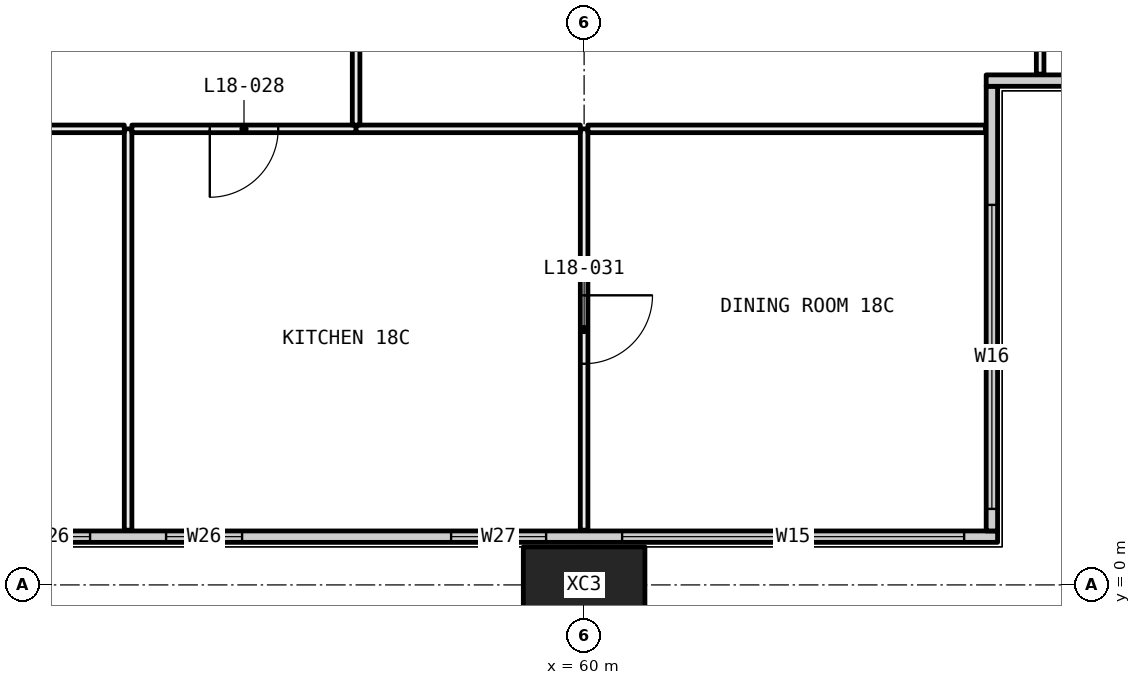
"""IFC4 building model, lengths in metres.
Left out: names, types, materials, properties, quantities, classifications, styles, units other than length and angle.
Written with IfcOpenShell. Run it as: python <this file> out.ifc"""

import sys

from ifc_helpers import new_model, si_unit, direction, frame, frame_2d, origin, origin_2d, place, context, subcontext, project, spatial, rectangle, hollow_rectangle, extrude, element, fill, save


model = new_model("IFC4")
c1 = context("Model", 3, precision=1e-05, world=origin(), true_north=direction((0.0, 1.0)))
c2 = subcontext(c1, "Body", "Model", "MODEL_VIEW")
j1 = project(units=[si_unit("LENGTHUNIT", "METRE"), si_unit("PLANEANGLEUNIT", "RADIAN")], contexts=[c1])
p1 = place(None, origin())
s1 = spatial("IfcSite", under=j1, at=p1, CompositionType="ELEMENT")
p2 = place(p1, origin())
s2 = spatial("IfcBuilding", under=s1, at=p2, CompositionType="ELEMENT")
p3 = place(p2, frame((0.0, 0.0, 74.85)))
s3 = spatial("IfcBuildingStorey", under=s2, at=p3, CompositionType="ELEMENT", Elevation=74.85)
p4 = place(p3, frame((60.0, 0.0, -0.4), z_axis=(0.0, 0.0, 1.0), x_axis=(1.0, 0.0, 0.0)))
e1 = element("IfcColumn", 1, at=p4, inside=s3, PredefinedType="COLUMN", context=c2, shape_type="SweptSolid", body=[
    extrude(hollow_rectangle(XDim=1.6, YDim=1.0, WallThickness=0.065, at=origin_2d()), origin(), (0.0, 0.0, 1.0), 3.45),
])
p5 = place(p3, frame((6.56, 0.635, 0.0), z_axis=(0.0, 0.0, 1.0), x_axis=(1.0, 0.0, 0.0)))
e2 = element("IfcWall", 2, at=p5, inside=s3, PredefinedType="ELEMENTEDWALL", context=c2, shape_type="SweptSolid", body=[
    extrude(rectangle(XDim=58.88, YDim=0.15, at=frame_2d((29.44, 0.0))), origin(), (0.0, 0.0, 1.0), 3.05),
])
p6 = place(p5, frame((0.44, 0.0, 0.45)))
e3 = element("IfcOpeningElement", 3, at=p6, cuts=e2, PredefinedType="OPENING", context=c2, shape_type="SweptSolid", body=[
    extrude(rectangle(XDim=4.5, YDim=2.55, at=frame_2d((2.25, 1.275))), frame((0.0, 0.085, 0.0), z_axis=(0.0, -1.0, 0.0), x_axis=(1.0, 0.0, 0.0)), (0.0, 0.0, 1.0), 0.17),
])
p7 = place(p5, frame((5.94, 0.0, 0.45)))
e4 = element("IfcOpeningElement", 4, at=p7, cuts=e2, PredefinedType="OPENING", context=c2, shape_type="SweptSolid", body=[
    extrude(rectangle(XDim=1.25, YDim=2.55, at=frame_2d((0.625, 1.275))), frame((0.0, 0.085, 0.0), z_axis=(0.0, -1.0, 0.0), x_axis=(1.0, 0.0, 0.0)), (0.0, 0.0, 1.0), 0.17),
])
p8 = place(p5, frame((9.94, 0.0, 0.45)))
e5 = element("IfcOpeningElement", 5, at=p8, cuts=e2, PredefinedType="OPENING", context=c2, shape_type="SweptSolid", body=[
    extrude(rectangle(XDim=1.0, YDim=2.55, at=frame_2d((0.5, 1.275))), frame((0.0, 0.085, 0.0), z_axis=(0.0, -1.0, 0.0), x_axis=(1.0, 0.0, 0.0)), (0.0, 0.0, 1.0), 0.17),
])
p9 = place(p5, frame((11.94, 0.0, 0.45)))
e6 = element("IfcOpeningElement", 6, at=p9, cuts=e2, PredefinedType="OPENING", context=c2, shape_type="SweptSolid", body=[
    extrude(rectangle(XDim=1.0, YDim=2.55, at=frame_2d((0.5, 1.275))), frame((0.0, 0.085, 0.0), z_axis=(0.0, -1.0, 0.0), x_axis=(1.0, 0.0, 0.0)), (0.0, 0.0, 1.0), 0.17),
])
p10 = place(p5, frame((15.69, 0.0, 0.45)))
e7 = element("IfcOpeningElement", 7, at=p10, cuts=e2, PredefinedType="OPENING", context=c2, shape_type="SweptSolid", body=[
    extrude(rectangle(XDim=1.25, YDim=2.55, at=frame_2d((0.625, 1.275))), frame((0.0, 0.085, 0.0), z_axis=(0.0, -1.0, 0.0), x_axis=(1.0, 0.0, 0.0)), (0.0, 0.0, 1.0), 0.17),
])
p11 = place(p5, frame((17.94, 0.0, 0.45)))
e8 = element("IfcOpeningElement", 8, at=p11, cuts=e2, PredefinedType="OPENING", context=c2, shape_type="SweptSolid", body=[
    extrude(rectangle(XDim=1.25, YDim=2.55, at=frame_2d((0.625, 1.275))), frame((0.0, 0.085, 0.0), z_axis=(0.0, -1.0, 0.0), x_axis=(1.0, 0.0, 0.0)), (0.0, 0.0, 1.0), 0.17),
])
p12 = place(p5, frame((21.94, 0.0, 0.45)))
e9 = element("IfcOpeningElement", 9, at=p12, cuts=e2, PredefinedType="OPENING", context=c2, shape_type="SweptSolid", body=[
    extrude(rectangle(XDim=1.0, YDim=2.55, at=frame_2d((0.5, 1.275))), frame((0.0, 0.085, 0.0), z_axis=(0.0, -1.0, 0.0), x_axis=(1.0, 0.0, 0.0)), (0.0, 0.0, 1.0), 0.17),
])
p13 = place(p5, frame((23.94, 0.0, 0.45)))
e10 = element("IfcOpeningElement", 10, at=p13, cuts=e2, PredefinedType="OPENING", context=c2, shape_type="SweptSolid", body=[
    extrude(rectangle(XDim=1.0, YDim=2.55, at=frame_2d((0.5, 1.275))), frame((0.0, 0.085, 0.0), z_axis=(0.0, -1.0, 0.0), x_axis=(1.0, 0.0, 0.0)), (0.0, 0.0, 1.0), 0.17),
])
p14 = place(p5, frame((27.69, 0.0, 0.45)))
e11 = element("IfcOpeningElement", 11, at=p14, cuts=e2, PredefinedType="OPENING", context=c2, shape_type="SweptSolid", body=[
    extrude(rectangle(XDim=1.25, YDim=2.55, at=frame_2d((0.625, 1.275))), frame((0.0, 0.085, 0.0), z_axis=(0.0, -1.0, 0.0), x_axis=(1.0, 0.0, 0.0)), (0.0, 0.0, 1.0), 0.17),
])
p15 = place(p5, frame((29.94, 0.0, 0.45)))
e12 = element("IfcOpeningElement", 12, at=p15, cuts=e2, PredefinedType="OPENING", context=c2, shape_type="SweptSolid", body=[
    extrude(rectangle(XDim=1.25, YDim=2.55, at=frame_2d((0.625, 1.275))), frame((0.0, 0.085, 0.0), z_axis=(0.0, -1.0, 0.0), x_axis=(1.0, 0.0, 0.0)), (0.0, 0.0, 1.0), 0.17),
])
p16 = place(p5, frame((33.94, 0.0, 0.45)))
e13 = element("IfcOpeningElement", 13, at=p16, cuts=e2, PredefinedType="OPENING", context=c2, shape_type="SweptSolid", body=[
    extrude(rectangle(XDim=1.0, YDim=2.55, at=frame_2d((0.5, 1.275))), frame((0.0, 0.085, 0.0), z_axis=(0.0, -1.0, 0.0), x_axis=(1.0, 0.0, 0.0)), (0.0, 0.0, 1.0), 0.17),
])
p17 = place(p5, frame((35.94, 0.0, 0.45)))
e14 = element("IfcOpeningElement", 14, at=p17, cuts=e2, PredefinedType="OPENING", context=c2, shape_type="SweptSolid", body=[
    extrude(rectangle(XDim=1.0, YDim=2.55, at=frame_2d((0.5, 1.275))), frame((0.0, 0.085, 0.0), z_axis=(0.0, -1.0, 0.0), x_axis=(1.0, 0.0, 0.0)), (0.0, 0.0, 1.0), 0.17),
])
p18 = place(p5, frame((39.69, 0.0, 0.45)))
e15 = element("IfcOpeningElement", 15, at=p18, cuts=e2, PredefinedType="OPENING", context=c2, shape_type="SweptSolid", body=[
    extrude(rectangle(XDim=1.25, YDim=2.55, at=frame_2d((0.625, 1.275))), frame((0.0, 0.085, 0.0), z_axis=(0.0, -1.0, 0.0), x_axis=(1.0, 0.0, 0.0)), (0.0, 0.0, 1.0), 0.17),
])
p19 = place(p5, frame((41.94, 0.0, 0.45)))
e16 = element("IfcOpeningElement", 16, at=p19, cuts=e2, PredefinedType="OPENING", context=c2, shape_type="SweptSolid", body=[
    extrude(rectangle(XDim=1.25, YDim=2.55, at=frame_2d((0.625, 1.275))), frame((0.0, 0.085, 0.0), z_axis=(0.0, -1.0, 0.0), x_axis=(1.0, 0.0, 0.0)), (0.0, 0.0, 1.0), 0.17),
])
p20 = place(p5, frame((45.94, 0.0, 0.45)))
e17 = element("IfcOpeningElement", 17, at=p20, cuts=e2, PredefinedType="OPENING", context=c2, shape_type="SweptSolid", body=[
    extrude(rectangle(XDim=1.0, YDim=2.55, at=frame_2d((0.5, 1.275))), frame((0.0, 0.085, 0.0), z_axis=(0.0, -1.0, 0.0), x_axis=(1.0, 0.0, 0.0)), (0.0, 0.0, 1.0), 0.17),
])
p21 = place(p5, frame((47.94, 0.0, 0.45)))
e18 = element("IfcOpeningElement", 18, at=p21, cuts=e2, PredefinedType="OPENING", context=c2, shape_type="SweptSolid", body=[
    extrude(rectangle(XDim=1.0, YDim=2.55, at=frame_2d((0.5, 1.275))), frame((0.0, 0.085, 0.0), z_axis=(0.0, -1.0, 0.0), x_axis=(1.0, 0.0, 0.0)), (0.0, 0.0, 1.0), 0.17),
])
p22 = place(p5, frame((51.69, 0.0, 0.45)))
e19 = element("IfcOpeningElement", 19, at=p22, cuts=e2, PredefinedType="OPENING", context=c2, shape_type="SweptSolid", body=[
    extrude(rectangle(XDim=1.25, YDim=2.55, at=frame_2d((0.625, 1.275))), frame((0.0, 0.085, 0.0), z_axis=(0.0, -1.0, 0.0), x_axis=(1.0, 0.0, 0.0)), (0.0, 0.0, 1.0), 0.17),
])
p23 = place(p5, frame((53.94, 0.0, 0.45)))
e20 = element("IfcOpeningElement", 20, at=p23, cuts=e2, PredefinedType="OPENING", context=c2, shape_type="SweptSolid", body=[
    extrude(rectangle(XDim=4.5, YDim=2.55, at=frame_2d((2.25, 1.275))), frame((0.0, 0.085, 0.0), z_axis=(0.0, -1.0, 0.0), x_axis=(1.0, 0.0, 0.0)), (0.0, 0.0, 1.0), 0.17),
])
p24 = place(p3, frame((65.365, 0.71, 0.0), z_axis=(0.0, 0.0, 1.0), x_axis=(0.0, 1.0, 0.0)))
e21 = element("IfcWall", 21, at=p24, inside=s3, PredefinedType="ELEMENTEDWALL", context=c2, shape_type="SweptSolid", body=[
    extrude(rectangle(XDim=5.85, YDim=0.15, at=frame_2d((2.925, 0.0))), origin(), (0.0, 0.0, 1.0), 3.05),
])
p25 = place(p24, frame((0.29, 0.0, 0.45)))
e22 = element("IfcOpeningElement", 22, at=p25, cuts=e21, PredefinedType="OPENING", context=c2, shape_type="SweptSolid", body=[
    extrude(rectangle(XDim=4.0, YDim=2.55, at=frame_2d((2.0, 1.275))), frame((0.0, 0.085, 0.0), z_axis=(0.0, -1.0, 0.0), x_axis=(1.0, 0.0, 0.0)), (0.0, 0.0, 1.0), 0.17),
])
p26 = place(p3, frame((65.29, 6.635, 0.0), z_axis=(0.0, 0.0, 1.0), x_axis=(1.0, 0.0, 0.0)))
e23 = element("IfcWall", 23, at=p26, inside=s3, PredefinedType="ELEMENTEDWALL", context=c2, shape_type="SweptSolid", body=[
    extrude(rectangle(XDim=6.15, YDim=0.15, at=frame_2d((3.075, 0.0))), origin(), (0.0, 0.0, 1.0), 3.05),
])
p27 = place(p26, frame((1.71, 0.0, 0.45)))
e24 = element("IfcOpeningElement", 24, at=p27, cuts=e23, PredefinedType="OPENING", context=c2, shape_type="SweptSolid", body=[
    extrude(rectangle(XDim=4.0, YDim=2.55, at=frame_2d((2.0, 1.275))), frame((0.0, 0.085, 0.0), z_axis=(0.0, -1.0, 0.0), x_axis=(1.0, 0.0, 0.0)), (0.0, 0.0, 1.0), 0.17),
])
p28 = place(p3, frame((54.0, 0.72, 0.0), z_axis=(0.0, 0.0, 1.0), x_axis=(0.0, 1.0, 0.0)))
e25 = element("IfcWall", 25, at=p28, inside=s3, PredefinedType="PARTITIONING", context=c2, shape_type="SweptSolid", body=[
    extrude(rectangle(XDim=5.28, YDim=0.1, at=frame_2d((2.64, 0.0))), origin(), (0.0, 0.0, 1.0), 3.05),
])
p29 = place(p3, frame((53.95, 6.0, 0.0), z_axis=(0.0, 0.0, 1.0), x_axis=(-1.0, 0.0, 0.0)))
e26 = element("IfcWall", 26, at=p29, inside=s3, PredefinedType="PARTITIONING", context=c2, shape_type="SweptSolid", body=[
    extrude(rectangle(XDim=5.9, YDim=0.1, at=frame_2d((2.95, 0.0))), origin(), (0.0, 0.0, 1.0), 2.45),
])
p30 = place(p29, frame((2.5, 0.0, 0.0)))
e27 = element("IfcOpeningElement", 27, at=p30, cuts=e26, PredefinedType="OPENING", context=c2, shape_type="SweptSolid", body=[
    extrude(rectangle(XDim=0.9, YDim=2.1, at=frame_2d((0.45, 1.05))), frame((0.0, 0.06, 0.0), z_axis=(0.0, -1.0, 0.0), x_axis=(1.0, 0.0, 0.0)), (0.0, 0.0, 1.0), 0.12),
])
p31 = place(p3, frame((60.0, 0.72, 0.0), z_axis=(0.0, 0.0, 1.0), x_axis=(0.0, 1.0, 0.0)))
e28 = element("IfcWall", 28, at=p31, inside=s3, PredefinedType="PARTITIONING", context=c2, shape_type="SweptSolid", body=[
    extrude(rectangle(XDim=5.28, YDim=0.1, at=frame_2d((2.64, 0.0))), origin(), (0.0, 0.0, 1.0), 2.45),
])
p32 = place(p31, frame((2.19, 0.0, 0.0)))
e29 = element("IfcOpeningElement", 29, at=p32, cuts=e28, PredefinedType="OPENING", context=c2, shape_type="SweptSolid", body=[
    extrude(rectangle(XDim=0.9, YDim=2.1, at=frame_2d((0.45, 1.05))), frame((0.0, 0.06, 0.0), z_axis=(0.0, -1.0, 0.0), x_axis=(1.0, 0.0, 0.0)), (0.0, 0.0, 1.0), 0.12),
])
p33 = place(p3, frame((57.0, 6.0, 0.0), z_axis=(0.0, 0.0, 1.0), x_axis=(-1.0, 0.0, 0.0)))
e30 = element("IfcWall", 30, at=p33, inside=s3, PredefinedType="PARTITIONING", context=c2, shape_type="SweptSolid", body=[
    extrude(rectangle(XDim=2.95, YDim=0.1, at=frame_2d((1.475, 0.0))), origin(), (0.0, 0.0, 1.0), 3.05),
])
p34 = place(p33, frame((1.025, 0.0, 0.0)))
e31 = element("IfcOpeningElement", 31, at=p34, cuts=e30, PredefinedType="OPENING", context=c2, shape_type="SweptSolid", body=[
    extrude(rectangle(XDim=0.9, YDim=2.1, at=frame_2d((0.45, 1.05))), frame((0.0, 0.06, 0.0), z_axis=(0.0, -1.0, 0.0), x_axis=(1.0, 0.0, 0.0)), (0.0, 0.0, 1.0), 0.12),
])
p35 = place(p3, frame((59.95, 6.0, 0.0), z_axis=(0.0, 0.0, 1.0), x_axis=(-1.0, 0.0, 0.0)))
e32 = element("IfcWall", 32, at=p35, inside=s3, PredefinedType="PARTITIONING", context=c2, shape_type="SweptSolid", body=[
    extrude(rectangle(XDim=2.95, YDim=0.1, at=frame_2d((1.475, 0.0))), origin(), (0.0, 0.0, 1.0), 2.45),
])
p36 = place(p3, frame((65.28, 6.0, 0.0), z_axis=(0.0, 0.0, 1.0), x_axis=(-1.0, 0.0, 0.0)))
e33 = element("IfcWall", 33, at=p36, inside=s3, PredefinedType="PARTITIONING", context=c2, shape_type="SweptSolid", body=[
    extrude(rectangle(XDim=5.23, YDim=0.1, at=frame_2d((2.615, 0.0))), origin(), (0.0, 0.0, 1.0), 2.45),
])
p37 = place(p3, frame((57.0, 6.05, 0.0), z_axis=(0.0, 0.0, 1.0), x_axis=(0.0, 1.0, 0.0)))
e34 = element("IfcWall", 34, at=p37, inside=s3, PredefinedType="PARTITIONING", context=c2, shape_type="SweptSolid", body=[
    extrude(rectangle(XDim=5.95, YDim=0.1, at=frame_2d((2.975, 0.0))), origin(), (0.0, 0.0, 1.0), 2.45),
])
p38 = place(p37, frame((2.525, 0.0, 0.0)))
e35 = element("IfcOpeningElement", 35, at=p38, cuts=e34, PredefinedType="OPENING", context=c2, shape_type="SweptSolid", body=[
    extrude(rectangle(XDim=0.9, YDim=2.1, at=frame_2d((0.45, 1.05))), frame((0.0, 0.06, 0.0), z_axis=(0.0, -1.0, 0.0), x_axis=(1.0, 0.0, 0.0)), (0.0, 0.0, 1.0), 0.12),
])
p39 = place(p3, frame((66.0, 6.72, 0.0), z_axis=(0.0, 0.0, 1.0), x_axis=(0.0, 1.0, 0.0)))
e36 = element("IfcWall", 36, at=p39, inside=s3, PredefinedType="PARTITIONING", context=c2, shape_type="SweptSolid", body=[
    extrude(rectangle(XDim=5.205, YDim=0.1, at=frame_2d((2.603, 0.0))), origin(), (0.0, 0.0, 1.0), 2.45),
])
p40 = place(p39, frame((2.153, 0.0, 0.0)))
e37 = element("IfcOpeningElement", 37, at=p40, cuts=e36, PredefinedType="OPENING", context=c2, shape_type="SweptSolid", body=[
    extrude(rectangle(XDim=0.9, YDim=2.1, at=frame_2d((0.45, 1.05))), frame((0.0, 0.06, 0.0), z_axis=(0.0, -1.0, 0.0), x_axis=(1.0, 0.0, 0.0)), (0.0, 0.0, 1.0), 0.12),
])
p41 = place(p20, origin())
e38 = element("IfcWindow", 38, at=p41, inside=s3, PartitioningType="SINGLE_PANEL", PredefinedType="WINDOW", context=c2, shape_type="SweptSolid", body=[
    extrude(rectangle(XDim=1.0, YDim=2.55, at=frame_2d((0.5, 1.275))), frame((0.0, 0.03, 0.0), z_axis=(0.0, -1.0, 0.0), x_axis=(1.0, 0.0, 0.0)), (0.0, 0.0, 1.0), 0.06),
])
fill(e17, e38)
p42 = place(p21, origin())
e39 = element("IfcWindow", 39, at=p42, inside=s3, PartitioningType="SINGLE_PANEL", PredefinedType="WINDOW", context=c2, shape_type="SweptSolid", body=[
    extrude(rectangle(XDim=1.0, YDim=2.55, at=frame_2d((0.5, 1.275))), frame((0.0, 0.03, 0.0), z_axis=(0.0, -1.0, 0.0), x_axis=(1.0, 0.0, 0.0)), (0.0, 0.0, 1.0), 0.06),
])
fill(e18, e39)
p43 = place(p22, origin())
e40 = element("IfcWindow", 40, at=p43, inside=s3, PartitioningType="SINGLE_PANEL", PredefinedType="WINDOW", context=c2, shape_type="SweptSolid", body=[
    extrude(rectangle(XDim=1.25, YDim=2.55, at=frame_2d((0.625, 1.275))), frame((0.0, 0.03, 0.0), z_axis=(0.0, -1.0, 0.0), x_axis=(1.0, 0.0, 0.0)), (0.0, 0.0, 1.0), 0.06),
])
fill(e19, e40)
p44 = place(p23, origin())
e41 = element("IfcWindow", 41, at=p44, inside=s3, PartitioningType="SINGLE_PANEL", PredefinedType="WINDOW", context=c2, shape_type="SweptSolid", body=[
    extrude(rectangle(XDim=4.5, YDim=2.55, at=frame_2d((2.25, 1.275))), frame((0.0, 0.03, 0.0), z_axis=(0.0, -1.0, 0.0), x_axis=(1.0, 0.0, 0.0)), (0.0, 0.0, 1.0), 0.06),
])
fill(e20, e41)
p45 = place(p25, origin())
e42 = element("IfcWindow", 42, at=p45, inside=s3, PartitioningType="SINGLE_PANEL", PredefinedType="WINDOW", context=c2, shape_type="SweptSolid", body=[
    extrude(rectangle(XDim=4.0, YDim=2.55, at=frame_2d((2.0, 1.275))), frame((0.0, 0.03, 0.0), z_axis=(0.0, -1.0, 0.0), x_axis=(1.0, 0.0, 0.0)), (0.0, 0.0, 1.0), 0.06),
])
fill(e22, e42)
p46 = place(p34, origin())
e43 = element("IfcDoor", 43, at=p46, inside=s3, OperationType="SINGLE_SWING_LEFT", PredefinedType="DOOR", context=c2, shape_type="SweptSolid", body=[
    extrude(rectangle(XDim=0.9, YDim=2.1, at=frame_2d((0.45, 1.05))), frame((0.0, 0.025, 0.0), z_axis=(0.0, -1.0, 0.0), x_axis=(1.0, 0.0, 0.0)), (0.0, 0.0, 1.0), 0.05),
])
fill(e31, e43)
p47 = place(p32, frame((0.9, 0.0, 0.0), x_axis=(-1.0, 0.0, 0.0)))
e44 = element("IfcDoor", 44, at=p47, inside=s3, OperationType="SINGLE_SWING_RIGHT", PredefinedType="DOOR", context=c2, shape_type="SweptSolid", body=[
    extrude(rectangle(XDim=0.9, YDim=2.1, at=frame_2d((0.45, 1.05))), frame((0.0, 0.025, 0.0), z_axis=(0.0, -1.0, 0.0), x_axis=(1.0, 0.0, 0.0)), (0.0, 0.0, 1.0), 0.05),
])
fill(e29, e44)
save(model, sys.argv[1])
